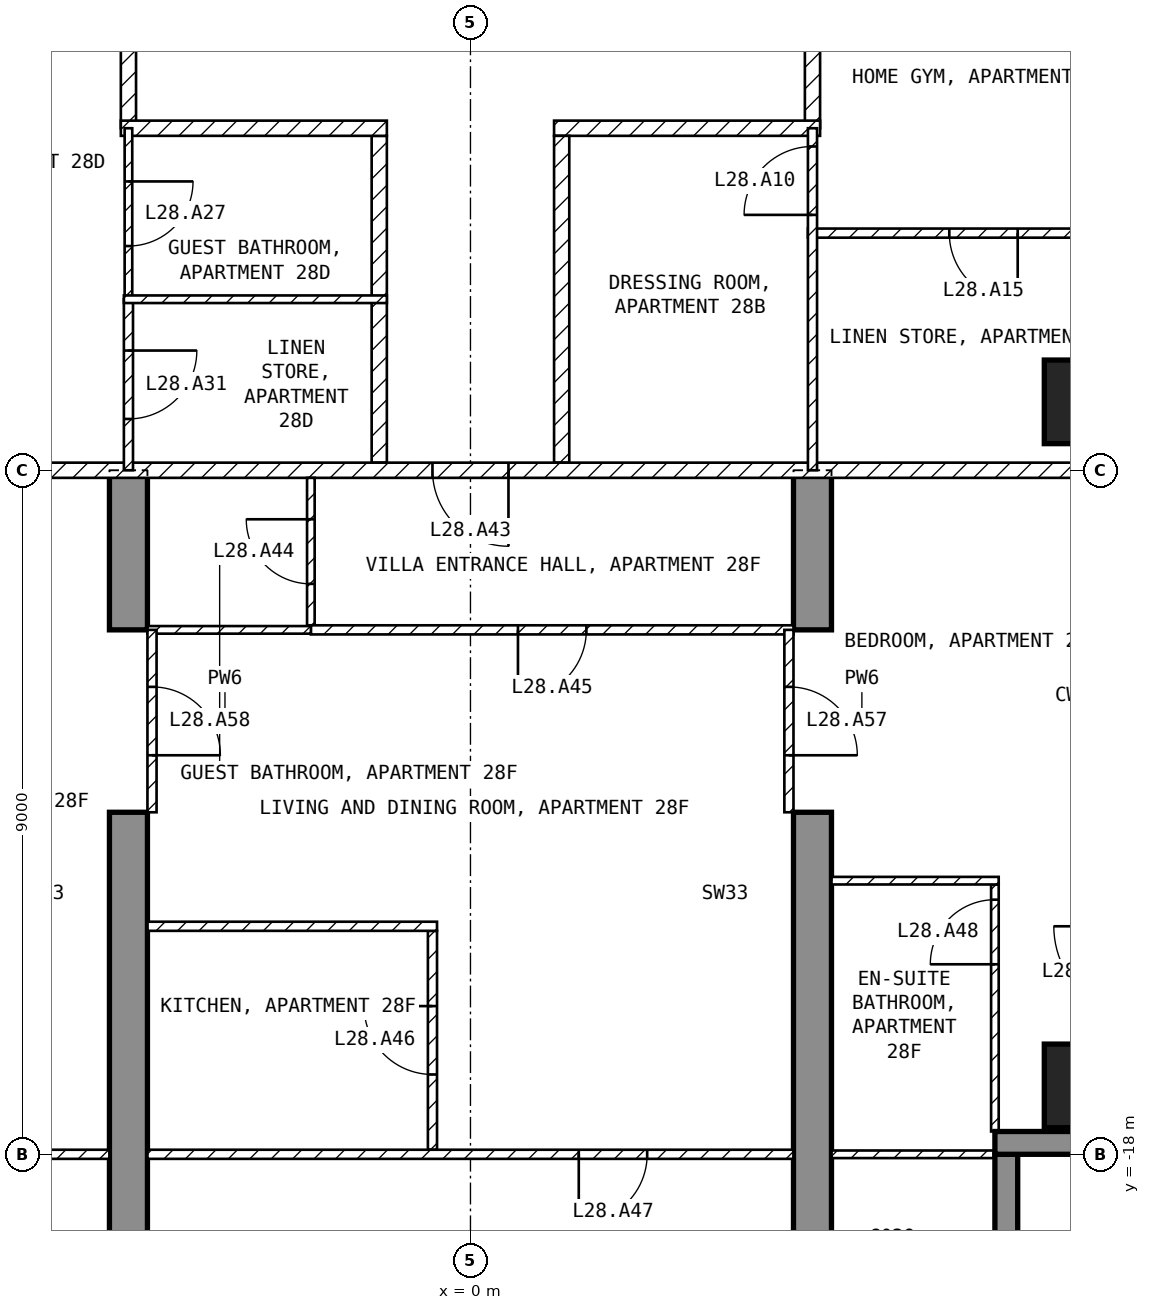
"""IFC4 building model, lengths in metres.
Left out: names, types, materials, properties, quantities, classifications, styles, units other than length and angle.
Written with IfcOpenShell. Run it as: python <this file> out.ifc"""

import sys

from ifc_helpers import new_model, si_unit, direction, frame, frame_2d, origin, origin_2d, place, context, subcontext, project, spatial, polyline, rectangle, outline, extrude, element, fill, save


model = new_model("IFC4")
c1 = context("Model", 3, precision=1e-05, world=origin(), true_north=direction((0.0, 1.0)))
c2 = subcontext(c1, "Body", "Model", "MODEL_VIEW")
j1 = project(units=[si_unit("LENGTHUNIT", "METRE"), si_unit("PLANEANGLEUNIT", "RADIAN")], contexts=[c1])
p1 = place(None, origin())
s1 = spatial("IfcSite", under=j1, at=p1, CompositionType="ELEMENT")
p2 = place(p1, origin())
s2 = spatial("IfcBuilding", under=s1, at=p2, CompositionType="ELEMENT")
p3 = place(p2, frame((0.0, 0.0, 119.9)))
s3 = spatial("IfcBuildingStorey", under=s2, at=p3, CompositionType="ELEMENT", Elevation=119.9)
for number, where, z_axis, x_axis in (
    (1, (8.1, -17.1, -0.25), (0.0, 0.0, 1.0), (1.0, 0.0, 0.0)),
    (2, (8.1, -8.1, -0.25), (0.0, 0.0, 1.0), (1.0, 0.0, 0.0)),
):
    element("IfcColumn", number, at=place(p3, frame(where, z_axis=z_axis, x_axis=x_axis)), inside=s3, PredefinedType="COLUMN", context=c2, shape_type="SweptSolid", body=[
        extrude(rectangle(XDim=1.1, YDim=1.1, at=origin_2d()), origin(), (0.0, 0.0, 1.0), 3.5),
    ])
for number, where, z_axis, x_axis in (
    (3, (-4.75, -20.15, -0.25), (1.0, 0.0, 0.0), (0.0, 1.0, 0.0)),
    (4, (4.25, -20.15, -0.25), (1.0, 0.0, 0.0), (0.0, 1.0, 0.0)),
):
    element("IfcWall", number, at=place(p3, frame(where, z_axis=z_axis, x_axis=x_axis)), inside=s3, PredefinedType="SHEAR", context=c2, shape_type="SweptSolid", body=[
        extrude(outline(polyline([(0.0, 0.0), (6.65, 0.0), (6.65, 2.65), (9.05, 2.65), (9.05, 0.0), (11.15, 0.0), (11.15, 3.5), (0.0, 3.5), (0.0, 0.0)])), origin(), (0.0, 0.0, 1.0), 0.5),
    ])
p4 = place(p3, frame((7.05, -19.8, 0.0), z_axis=(0.0, 0.0, 1.0), x_axis=(0.0, 1.0, 0.0)))
e5 = element("IfcWall", 5, at=p4, inside=s3, PredefinedType="SOLIDWALL", context=c2, shape_type="SweptSolid", body=[
    extrude(rectangle(XDim=1.8, YDim=0.3, at=frame_2d((0.9, 0.0))), origin(), (0.0, 0.0, 1.0), 3.25),
])
p5 = place(p3, frame((6.9, -17.85, 0.0), z_axis=(0.0, 0.0, 1.0), x_axis=(1.0, 0.0, 0.0)))
e6 = element("IfcWall", 6, at=p5, inside=s3, PredefinedType="SOLIDWALL", context=c2, shape_type="SweptSolid", body=[
    extrude(rectangle(XDim=1.85, YDim=0.3, at=frame_2d((0.925, 0.0))), origin(), (0.0, 0.0, 1.0), 3.25),
])
p6 = place(p3, frame((4.5, -1.3, 0.0), z_axis=(0.0, 0.0, 1.0), x_axis=(0.0, -1.0, 0.0)))
e7 = element("IfcWall", 7, at=p6, inside=s3, PredefinedType="PARTITIONING", context=c2, shape_type="SweptSolid", body=[
    extrude(rectangle(XDim=3.2, YDim=0.2, at=frame_2d((1.6, 0.0))), origin(), (0.0, 0.0, 1.0), 3.25),
])
p7 = place(p3, frame((4.6, -4.5, 0.0), z_axis=(0.0, 0.0, 1.0), x_axis=(-1.0, 0.0, 0.0)))
e8 = element("IfcWall", 8, at=p7, inside=s3, PredefinedType="PARTITIONING", context=c2, shape_type="SweptSolid", body=[
    extrude(rectangle(XDim=3.5, YDim=0.2, at=frame_2d((1.75, 0.0))), origin(), (0.0, 0.0, 1.0), 3.25),
])
p8 = place(p3, frame((1.2, -4.6, 0.0), z_axis=(0.0, 0.0, 1.0), x_axis=(0.0, -1.0, 0.0)))
e9 = element("IfcWall", 9, at=p8, inside=s3, PredefinedType="PARTITIONING", context=c2, shape_type="SweptSolid", body=[
    extrude(rectangle(XDim=4.3, YDim=0.2, at=frame_2d((2.15, 0.0))), origin(), (0.0, 0.0, 1.0), 3.25),
])
p9 = place(p3, frame((-4.5, -4.5, 0.0), z_axis=(0.0, 0.0, 1.0), x_axis=(0.0, 1.0, 0.0)))
e10 = element("IfcWall", 10, at=p9, inside=s3, PredefinedType="PARTITIONING", context=c2, shape_type="SweptSolid", body=[
    extrude(rectangle(XDim=3.2, YDim=0.2, at=frame_2d((1.6, 0.0))), origin(), (0.0, 0.0, 1.0), 3.25),
])
p10 = place(p3, frame((-1.2, -8.9, 0.0), z_axis=(0.0, 0.0, 1.0), x_axis=(0.0, 1.0, 0.0)))
e11 = element("IfcWall", 11, at=p10, inside=s3, PredefinedType="PARTITIONING", context=c2, shape_type="SweptSolid", body=[
    extrude(rectangle(XDim=4.3, YDim=0.2, at=frame_2d((2.15, 0.0))), origin(), (0.0, 0.0, 1.0), 3.25),
])
p11 = place(p3, frame((-1.1, -4.5, 0.0), z_axis=(0.0, 0.0, 1.0), x_axis=(-1.0, 0.0, 0.0)))
e12 = element("IfcWall", 12, at=p11, inside=s3, PredefinedType="PARTITIONING", context=c2, shape_type="SweptSolid", body=[
    extrude(rectangle(XDim=3.5, YDim=0.2, at=frame_2d((1.75, 0.0))), origin(), (0.0, 0.0, 1.0), 3.25),
])
p12 = place(p3, frame((8.92, -9.0, 0.0), z_axis=(0.0, 0.0, 1.0), x_axis=(-1.0, 0.0, 0.0)))
e13 = element("IfcWall", 13, at=p12, inside=s3, PredefinedType="PARTITIONING", context=c2, shape_type="SweptSolid", body=[
    extrude(rectangle(XDim=17.84, YDim=0.2, at=frame_2d((8.92, 0.0))), origin(), (0.0, 0.0, 1.0), 3.25),
])
p13 = place(p12, frame((8.42, 0.0, 0.0)))
e14 = element("IfcOpeningElement", 14, at=p13, cuts=e13, PredefinedType="OPENING", context=c2, shape_type="SweptSolid", body=[
    extrude(rectangle(XDim=1.0, YDim=2.1, at=frame_2d((0.5, 1.05))), frame((0.0, 0.11, 0.0), z_axis=(0.0, -1.0, 0.0), x_axis=(1.0, 0.0, 0.0)), (0.0, 0.0, 1.0), 0.22),
])
p14 = place(p3, frame((9.06, -5.88, 0.0), z_axis=(0.0, 0.0, 1.0), x_axis=(-1.0, 0.0, 0.0)))
e15 = element("IfcWall", 15, at=p14, inside=s3, PredefinedType="PARTITIONING", context=c2, shape_type="SweptSolid", body=[
    extrude(rectangle(XDim=4.62, YDim=0.12, at=frame_2d((2.31, 0.0))), origin(), (0.0, 0.0, 1.0), 3.25),
])
p15 = place(p14, frame((1.86, 0.0, 0.0)))
e16 = element("IfcOpeningElement", 16, at=p15, cuts=e15, PredefinedType="OPENING", context=c2, shape_type="SweptSolid", body=[
    extrude(rectangle(XDim=0.9, YDim=2.1, at=frame_2d((0.45, 1.05))), frame((0.0, 0.07, 0.0), z_axis=(0.0, -1.0, 0.0), x_axis=(1.0, 0.0, 0.0)), (0.0, 0.0, 1.0), 0.14),
])
p16 = place(p3, frame((4.5, -9.0, 0.0), z_axis=(0.0, 0.0, 1.0), x_axis=(0.0, 1.0, 0.0)))
e17 = element("IfcWall", 17, at=p16, inside=s3, PredefinedType="PARTITIONING", context=c2, shape_type="SweptSolid", body=[
    extrude(rectangle(XDim=4.5, YDim=0.12, at=frame_2d((2.25, 0.0))), origin(), (0.0, 0.0, 1.0), 3.25),
])
p17 = place(p16, frame((3.36, 0.0, 0.0)))
e18 = element("IfcOpeningElement", 18, at=p17, cuts=e17, PredefinedType="OPENING", context=c2, shape_type="SweptSolid", body=[
    extrude(rectangle(XDim=0.9, YDim=2.1, at=frame_2d((0.45, 1.05))), frame((0.0, 0.07, 0.0), z_axis=(0.0, -1.0, 0.0), x_axis=(1.0, 0.0, 0.0)), (0.0, 0.0, 1.0), 0.14),
])
p18 = place(p3, frame((-4.5, -4.5, 0.0), z_axis=(0.0, 0.0, 1.0), x_axis=(0.0, -1.0, 0.0)))
e19 = element("IfcWall", 19, at=p18, inside=s3, PredefinedType="PARTITIONING", context=c2, shape_type="SweptSolid", body=[
    extrude(rectangle(XDim=2.25, YDim=0.1, at=frame_2d((1.125, 0.0))), origin(), (0.0, 0.0, 1.0), 3.25),
])
p19 = place(p18, frame((0.7, 0.0, 0.0)))
e20 = element("IfcOpeningElement", 20, at=p19, cuts=e19, PredefinedType="OPENING", context=c2, shape_type="SweptSolid", body=[
    extrude(rectangle(XDim=0.85, YDim=2.1, at=frame_2d((0.425, 1.05))), frame((0.0, 0.06, 0.0), z_axis=(0.0, -1.0, 0.0), x_axis=(1.0, 0.0, 0.0)), (0.0, 0.0, 1.0), 0.12),
])
p20 = place(p3, frame((-4.5, -6.75, 0.0), z_axis=(0.0, 0.0, 1.0), x_axis=(0.0, -1.0, 0.0)))
e21 = element("IfcWall", 21, at=p20, inside=s3, PredefinedType="PARTITIONING", context=c2, shape_type="SweptSolid", body=[
    extrude(rectangle(XDim=2.25, YDim=0.12, at=frame_2d((1.125, 0.0))), origin(), (0.0, 0.0, 1.0), 3.25),
])
p21 = place(p20, frame((0.675, 0.0, 0.0)))
e22 = element("IfcOpeningElement", 22, at=p21, cuts=e21, PredefinedType="OPENING", context=c2, shape_type="SweptSolid", body=[
    extrude(rectangle(XDim=0.9, YDim=2.1, at=frame_2d((0.45, 1.05))), frame((0.0, 0.07, 0.0), z_axis=(0.0, -1.0, 0.0), x_axis=(1.0, 0.0, 0.0)), (0.0, 0.0, 1.0), 0.14),
])
p22 = place(p3, frame((-1.1, -6.75, 0.0), z_axis=(0.0, 0.0, 1.0), x_axis=(-1.0, 0.0, 0.0)))
e23 = element("IfcWall", 23, at=p22, inside=s3, PredefinedType="PARTITIONING", context=c2, shape_type="SweptSolid", body=[
    extrude(rectangle(XDim=3.46, YDim=0.1, at=frame_2d((1.73, 0.0))), origin(), (0.0, 0.0, 1.0), 3.25),
])
p23 = place(p3, frame((-2.1, -11.04, 0.0), z_axis=(0.0, 0.0, 1.0), x_axis=(0.0, 1.0, 0.0)))
e24 = element("IfcWall", 24, at=p23, inside=s3, PredefinedType="PARTITIONING", context=c2, shape_type="SweptSolid", body=[
    extrude(rectangle(XDim=1.94, YDim=0.1, at=frame_2d((0.97, 0.0))), origin(), (0.0, 0.0, 1.0), 3.25),
])
p24 = place(p23, frame((0.545, 0.0, 0.0)))
e25 = element("IfcOpeningElement", 25, at=p24, cuts=e24, PredefinedType="OPENING", context=c2, shape_type="SweptSolid", body=[
    extrude(rectangle(XDim=0.85, YDim=2.1, at=frame_2d((0.425, 1.05))), frame((0.0, 0.06, 0.0), z_axis=(0.0, -1.0, 0.0), x_axis=(1.0, 0.0, 0.0)), (0.0, 0.0, 1.0), 0.12),
])
p25 = place(p3, frame((4.25, -11.1, 0.0), z_axis=(0.0, 0.0, 1.0), x_axis=(-1.0, 0.0, 0.0)))
e26 = element("IfcWall", 26, at=p25, inside=s3, PredefinedType="PARTITIONING", context=c2, shape_type="SweptSolid", body=[
    extrude(rectangle(XDim=6.35, YDim=0.12, at=frame_2d((3.175, 0.0))), origin(), (0.0, 0.0, 1.0), 3.25),
])
p26 = place(p25, frame((2.725, 0.0, 0.0)))
e27 = element("IfcOpeningElement", 27, at=p26, cuts=e26, PredefinedType="OPENING", context=c2, shape_type="SweptSolid", body=[
    extrude(rectangle(XDim=0.9, YDim=2.1, at=frame_2d((0.45, 1.05))), frame((0.0, 0.07, 0.0), z_axis=(0.0, -1.0, 0.0), x_axis=(1.0, 0.0, 0.0)), (0.0, 0.0, 1.0), 0.14),
])
p27 = place(p3, frame((-2.1, -11.1, 0.0), z_axis=(0.0, 0.0, 1.0), x_axis=(-1.0, 0.0, 0.0)))
e28 = element("IfcWall", 28, at=p27, inside=s3, PredefinedType="PARTITIONING", context=c2, shape_type="SweptSolid", body=[
    extrude(rectangle(XDim=2.15, YDim=0.1, at=frame_2d((1.075, 0.0))), origin(), (0.0, 0.0, 1.0), 3.25),
])
p28 = place(p3, frame((-0.5, -17.94, 0.0), z_axis=(0.0, 0.0, 1.0), x_axis=(0.0, 1.0, 0.0)))
e29 = element("IfcWall", 29, at=p28, inside=s3, PredefinedType="PARTITIONING", context=c2, shape_type="SweptSolid", body=[
    extrude(rectangle(XDim=2.88, YDim=0.12, at=frame_2d((1.44, 0.0))), origin(), (0.0, 0.0, 1.0), 3.25),
])
p29 = place(p28, frame((0.99, 0.0, 0.0)))
e30 = element("IfcOpeningElement", 30, at=p29, cuts=e29, PredefinedType="OPENING", context=c2, shape_type="SweptSolid", body=[
    extrude(rectangle(XDim=0.9, YDim=2.1, at=frame_2d((0.45, 1.05))), frame((0.0, 0.07, 0.0), z_axis=(0.0, -1.0, 0.0), x_axis=(1.0, 0.0, 0.0)), (0.0, 0.0, 1.0), 0.14),
])
p30 = place(p3, frame((-0.44, -15.0, 0.0), z_axis=(0.0, 0.0, 1.0), x_axis=(-1.0, 0.0, 0.0)))
e31 = element("IfcWall", 31, at=p30, inside=s3, PredefinedType="PARTITIONING", context=c2, shape_type="SweptSolid", body=[
    extrude(rectangle(XDim=3.81, YDim=0.12, at=frame_2d((1.905, 0.0))), origin(), (0.0, 0.0, 1.0), 3.25),
])
p31 = place(p3, frame((4.25, -18.0, 0.0), z_axis=(0.0, 0.0, 1.0), x_axis=(-1.0, 0.0, 0.0)))
e32 = element("IfcWall", 32, at=p31, inside=s3, PredefinedType="PARTITIONING", context=c2, shape_type="SweptSolid", body=[
    extrude(rectangle(XDim=8.5, YDim=0.12, at=frame_2d((4.25, 0.0))), origin(), (0.0, 0.0, 1.0), 3.25),
])
p32 = place(p31, frame((1.925, 0.0, 0.0)))
e33 = element("IfcOpeningElement", 33, at=p32, cuts=e32, PredefinedType="OPENING", context=c2, shape_type="SweptSolid", body=[
    extrude(rectangle(XDim=0.9, YDim=2.1, at=frame_2d((0.45, 1.05))), frame((0.0, 0.07, 0.0), z_axis=(0.0, -1.0, 0.0), x_axis=(1.0, 0.0, 0.0)), (0.0, 0.0, 1.0), 0.14),
])
p33 = place(p3, frame((6.9, -17.7, 0.0), z_axis=(0.0, 0.0, 1.0), x_axis=(0.0, 1.0, 0.0)))
e34 = element("IfcWall", 34, at=p33, inside=s3, PredefinedType="PARTITIONING", context=c2, shape_type="SweptSolid", body=[
    extrude(rectangle(XDim=3.25, YDim=0.1, at=frame_2d((1.625, 0.0))), origin(), (0.0, 0.0, 1.0), 3.25),
])
p34 = place(p33, frame((2.2, 0.0, 0.0)))
e35 = element("IfcOpeningElement", 35, at=p34, cuts=e34, PredefinedType="OPENING", context=c2, shape_type="SweptSolid", body=[
    extrude(rectangle(XDim=0.85, YDim=2.1, at=frame_2d((0.425, 1.05))), frame((0.0, 0.06, 0.0), z_axis=(0.0, -1.0, 0.0), x_axis=(1.0, 0.0, 0.0)), (0.0, 0.0, 1.0), 0.12),
])
p35 = place(p3, frame((6.95, -14.4, 0.0), z_axis=(0.0, 0.0, 1.0), x_axis=(-1.0, 0.0, 0.0)))
e36 = element("IfcWall", 36, at=p35, inside=s3, PredefinedType="PARTITIONING", context=c2, shape_type="SweptSolid", body=[
    extrude(rectangle(XDim=2.2, YDim=0.1, at=frame_2d((1.1, 0.0))), origin(), (0.0, 0.0, 1.0), 3.25),
])
p36 = place(p3, frame((7.12, -18.0, 0.0), z_axis=(0.0, 0.0, 1.0), x_axis=(-1.0, 0.0, 0.0)))
e37 = element("IfcWall", 37, at=p36, inside=s3, PredefinedType="PARTITIONING", context=c2, shape_type="SweptSolid", body=[
    extrude(rectangle(XDim=2.37, YDim=0.1, at=frame_2d((1.185, 0.0))), origin(), (0.0, 0.0, 1.0), 3.25),
])
p37 = place(p3, frame((-4.75, -18.0, 0.0), z_axis=(0.0, 0.0, 1.0), x_axis=(-1.0, 0.0, 0.0)))
e38 = element("IfcWall", 38, at=p37, inside=s3, PredefinedType="PARTITIONING", context=c2, shape_type="SweptSolid", body=[
    extrude(rectangle(XDim=2.37, YDim=0.12, at=frame_2d((1.185, 0.0))), origin(), (0.0, 0.0, 1.0), 3.25),
])
p38 = place(p3, frame((4.19, -11.1, 0.0), z_axis=(0.0, 0.0, 1.0), x_axis=(0.0, -1.0, 0.0)))
e39 = element("IfcWall", 39, at=p38, inside=s3, PredefinedType="PARTITIONING", context=c2, shape_type="SweptSolid", body=[
    extrude(rectangle(XDim=2.4, YDim=0.12, at=frame_2d((1.2, 0.0))), origin(), (0.0, 0.0, 1.0), 2.4),
])
p39 = place(p38, frame((0.75, 0.0, 0.0)))
e40 = element("IfcOpeningElement", 40, at=p39, cuts=e39, PredefinedType="OPENING", context=c2, shape_type="SweptSolid", body=[
    extrude(rectangle(XDim=0.9, YDim=2.1, at=frame_2d((0.45, 1.05))), frame((0.0, 0.07, 0.0), z_axis=(0.0, -1.0, 0.0), x_axis=(1.0, 0.0, 0.0)), (0.0, 0.0, 1.0), 0.14),
])
p40 = place(p3, frame((-4.19, -11.1, 0.0), z_axis=(0.0, 0.0, 1.0), x_axis=(0.0, -1.0, 0.0)))
e41 = element("IfcWall", 41, at=p40, inside=s3, PredefinedType="PARTITIONING", context=c2, shape_type="SweptSolid", body=[
    extrude(rectangle(XDim=2.4, YDim=0.12, at=frame_2d((1.2, 0.0))), origin(), (0.0, 0.0, 1.0), 2.4),
])
p41 = place(p40, frame((0.75, 0.0, 0.0)))
e42 = element("IfcOpeningElement", 42, at=p41, cuts=e41, PredefinedType="OPENING", context=c2, shape_type="SweptSolid", body=[
    extrude(rectangle(XDim=0.9, YDim=2.1, at=frame_2d((0.45, 1.05))), frame((0.0, 0.07, 0.0), z_axis=(0.0, -1.0, 0.0), x_axis=(1.0, 0.0, 0.0)), (0.0, 0.0, 1.0), 0.14),
])
p42 = place(p17, origin())
e43 = element("IfcDoor", 43, at=p42, inside=s3, OperationType="SINGLE_SWING_LEFT", PredefinedType="DOOR", context=c2, shape_type="SweptSolid", body=[
    extrude(rectangle(XDim=0.9, YDim=2.1, at=frame_2d((0.45, 1.05))), frame((0.0, 0.025, 0.0), z_axis=(0.0, -1.0, 0.0), x_axis=(1.0, 0.0, 0.0)), (0.0, 0.0, 1.0), 0.05),
])
fill(e18, e43)
p43 = place(p15, origin())
e44 = element("IfcDoor", 44, at=p43, inside=s3, OperationType="SINGLE_SWING_LEFT", PredefinedType="DOOR", context=c2, shape_type="SweptSolid", body=[
    extrude(rectangle(XDim=0.9, YDim=2.1, at=frame_2d((0.45, 1.05))), frame((0.0, 0.025, 0.0), z_axis=(0.0, -1.0, 0.0), x_axis=(1.0, 0.0, 0.0)), (0.0, 0.0, 1.0), 0.05),
])
fill(e16, e44)
p44 = place(p19, origin())
e45 = element("IfcDoor", 45, at=p44, inside=s3, OperationType="SINGLE_SWING_LEFT", PredefinedType="DOOR", context=c2, shape_type="SweptSolid", body=[
    extrude(rectangle(XDim=0.85, YDim=2.1, at=frame_2d((0.425, 1.05))), frame((0.0, 0.025, 0.0), z_axis=(0.0, -1.0, 0.0), x_axis=(1.0, 0.0, 0.0)), (0.0, 0.0, 1.0), 0.05),
])
fill(e20, e45)
p45 = place(p21, origin())
e46 = element("IfcDoor", 46, at=p45, inside=s3, OperationType="SINGLE_SWING_LEFT", PredefinedType="DOOR", context=c2, shape_type="SweptSolid", body=[
    extrude(rectangle(XDim=0.9, YDim=2.1, at=frame_2d((0.45, 1.05))), frame((0.0, 0.025, 0.0), z_axis=(0.0, -1.0, 0.0), x_axis=(1.0, 0.0, 0.0)), (0.0, 0.0, 1.0), 0.05),
])
fill(e22, e46)
p46 = place(p13, origin())
e47 = element("IfcDoor", 47, at=p46, inside=s3, OperationType="SINGLE_SWING_LEFT", PredefinedType="DOOR", context=c2, shape_type="SweptSolid", body=[
    extrude(rectangle(XDim=1.0, YDim=2.1, at=frame_2d((0.5, 1.05))), frame((0.0, 0.025, 0.0), z_axis=(0.0, -1.0, 0.0), x_axis=(1.0, 0.0, 0.0)), (0.0, 0.0, 1.0), 0.05),
])
fill(e14, e47)
p47 = place(p24, origin())
e48 = element("IfcDoor", 48, at=p47, inside=s3, OperationType="SINGLE_SWING_RIGHT", PredefinedType="DOOR", context=c2, shape_type="SweptSolid", body=[
    extrude(rectangle(XDim=0.85, YDim=2.1, at=frame_2d((0.425, 1.05))), frame((0.0, 0.025, 0.0), z_axis=(0.0, -1.0, 0.0), x_axis=(1.0, 0.0, 0.0)), (0.0, 0.0, 1.0), 0.05),
])
fill(e25, e48)
p48 = place(p26, origin())
e49 = element("IfcDoor", 49, at=p48, inside=s3, OperationType="SINGLE_SWING_RIGHT", PredefinedType="DOOR", context=c2, shape_type="SweptSolid", body=[
    extrude(rectangle(XDim=0.9, YDim=2.1, at=frame_2d((0.45, 1.05))), frame((0.0, 0.025, 0.0), z_axis=(0.0, -1.0, 0.0), x_axis=(1.0, 0.0, 0.0)), (0.0, 0.0, 1.0), 0.05),
])
fill(e27, e49)
p49 = place(p29, origin())
e50 = element("IfcDoor", 50, at=p49, inside=s3, OperationType="SINGLE_SWING_RIGHT", PredefinedType="DOOR", context=c2, shape_type="SweptSolid", body=[
    extrude(rectangle(XDim=0.9, YDim=2.1, at=frame_2d((0.45, 1.05))), frame((0.0, 0.025, 0.0), z_axis=(0.0, -1.0, 0.0), x_axis=(1.0, 0.0, 0.0)), (0.0, 0.0, 1.0), 0.05),
])
fill(e30, e50)
p50 = place(p32, origin())
e51 = element("IfcDoor", 51, at=p50, inside=s3, OperationType="SINGLE_SWING_RIGHT", PredefinedType="DOOR", context=c2, shape_type="SweptSolid", body=[
    extrude(rectangle(XDim=0.9, YDim=2.1, at=frame_2d((0.45, 1.05))), frame((0.0, 0.025, 0.0), z_axis=(0.0, -1.0, 0.0), x_axis=(1.0, 0.0, 0.0)), (0.0, 0.0, 1.0), 0.05),
])
fill(e33, e51)
p51 = place(p34, origin())
e52 = element("IfcDoor", 52, at=p51, inside=s3, OperationType="SINGLE_SWING_LEFT", PredefinedType="DOOR", context=c2, shape_type="SweptSolid", body=[
    extrude(rectangle(XDim=0.85, YDim=2.1, at=frame_2d((0.425, 1.05))), frame((0.0, 0.025, 0.0), z_axis=(0.0, -1.0, 0.0), x_axis=(1.0, 0.0, 0.0)), (0.0, 0.0, 1.0), 0.05),
])
fill(e35, e52)
p52 = place(p39, origin())
e53 = element("IfcDoor", 53, at=p52, inside=s3, OperationType="SINGLE_SWING_RIGHT", PredefinedType="DOOR", context=c2, shape_type="SweptSolid", body=[
    extrude(rectangle(XDim=0.9, YDim=2.1, at=frame_2d((0.45, 1.05))), frame((0.0, 0.025, 0.0), z_axis=(0.0, -1.0, 0.0), x_axis=(1.0, 0.0, 0.0)), (0.0, 0.0, 1.0), 0.05),
])
fill(e40, e53)
p53 = place(p41, origin())
e54 = element("IfcDoor", 54, at=p53, inside=s3, OperationType="SINGLE_SWING_RIGHT", PredefinedType="DOOR", context=c2, shape_type="SweptSolid", body=[
    extrude(rectangle(XDim=0.9, YDim=2.1, at=frame_2d((0.45, 1.05))), frame((0.0, 0.025, 0.0), z_axis=(0.0, -1.0, 0.0), x_axis=(1.0, 0.0, 0.0)), (0.0, 0.0, 1.0), 0.05),
])
fill(e42, e54)
save(model, sys.argv[1])
